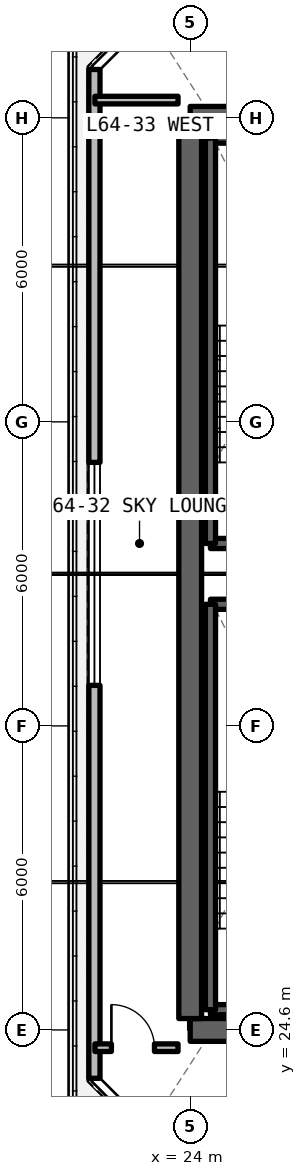
"""IFC4 building model, lengths in metres.
Left out: names, types, materials, properties, quantities, classifications, styles, units other than length and angle.
Written with IfcOpenShell. Run it as: python <this file> out.ifc"""

import sys

from ifc_helpers import new_model, si_unit, direction, frame, frame_2d, origin, place, context, subcontext, project, spatial, rectangle, extrude, element, fill, save


model = new_model("IFC4")
c1 = context("Model", 3, precision=1e-05, world=origin(), true_north=direction((0.0, 1.0)))
c2 = subcontext(c1, "Body", "Model", "MODEL_VIEW")
j1 = project(units=[si_unit("LENGTHUNIT", "METRE"), si_unit("PLANEANGLEUNIT", "RADIAN")], contexts=[c1])
p1 = place(None, origin())
s1 = spatial("IfcSite", under=j1, at=p1, CompositionType="ELEMENT")
p2 = place(p1, origin())
s2 = spatial("IfcBuilding", under=s1, at=p2, CompositionType="ELEMENT")
p3 = place(p2, frame((0.0, 0.0, 229.35)))
s3 = spatial("IfcBuildingStorey", under=s2, at=p3, CompositionType="ELEMENT", Elevation=229.35)
p4 = place(p3, frame((24.0, 24.6, 0.0), z_axis=(0.0, 0.0, 1.0), x_axis=(1.0, 0.0, 0.0)))
e1 = element("IfcWall", 1, at=p4, inside=s3, PredefinedType="SHEAR", context=c2, shape_type="SweptSolid", body=[
    extrude(rectangle(XDim=12.0, YDim=0.45, at=frame_2d((6.0, 0.0))), origin(), (0.0, 0.0, 1.0), 3.3),
])
p5 = place(p4, frame((7.2, 0.0, 0.0)))
e2 = element("IfcOpeningElement", 2, at=p5, cuts=e1, PredefinedType="OPENING", context=c2, shape_type="SweptSolid", body=[
    extrude(rectangle(XDim=1.0, YDim=2.15, at=frame_2d((0.5, 1.075))), frame((0.0, 0.235, 0.0), z_axis=(0.0, -1.0, 0.0), x_axis=(1.0, 0.0, 0.0)), (0.0, 0.0, 1.0), 0.47),
])
p6 = place(p3, frame((36.0, 42.6, 0.0), z_axis=(0.0, 0.0, 1.0), x_axis=(-1.0, 0.0, 0.0)))
e3 = element("IfcWall", 3, at=p6, inside=s3, PredefinedType="SHEAR", context=c2, shape_type="SweptSolid", body=[
    extrude(rectangle(XDim=12.0, YDim=0.45, at=frame_2d((6.0, 0.0))), origin(), (0.0, 0.0, 1.0), 3.3),
])
p7 = place(p6, frame((3.8, 0.0, 0.0)))
e4 = element("IfcOpeningElement", 4, at=p7, cuts=e3, PredefinedType="OPENING", context=c2, shape_type="SweptSolid", body=[
    extrude(rectangle(XDim=1.0, YDim=2.15, at=frame_2d((0.5, 1.075))), frame((0.0, 0.235, 0.0), z_axis=(0.0, -1.0, 0.0), x_axis=(1.0, 0.0, 0.0)), (0.0, 0.0, 1.0), 0.47),
])
p8 = place(p3, frame((24.0, 24.825, 0.0), z_axis=(0.0, 0.0, 1.0), x_axis=(0.0, 1.0, 0.0)))
e5 = element("IfcWall", 5, at=p8, inside=s3, PredefinedType="SHEAR", context=c2, shape_type="SweptSolid", body=[
    extrude(rectangle(XDim=17.55, YDim=0.45, at=frame_2d((8.775, 0.0))), origin(), (0.0, 0.0, 1.0), 3.3),
])
p9 = place(p3, frame((22.11, 43.554, 0.0), z_axis=(0.0, 0.0, 1.0), x_axis=(0.0, -1.0, 0.0)))
e6 = element("IfcWall", 6, at=p9, inside=s3, PredefinedType="SOLIDWALL", context=c2, shape_type="SweptSolid", body=[
    extrude(rectangle(XDim=19.909, YDim=0.22, at=frame_2d((9.955, 0.0))), origin(), (0.0, 0.0, 1.0), 3.08),
])
p10 = place(p9, frame((7.754, 0.0, 0.78)))
e7 = element("IfcOpeningElement", 7, at=p10, cuts=e6, PredefinedType="OPENING", context=c2, shape_type="SweptSolid", body=[
    extrude(rectangle(XDim=4.4, YDim=1.66, at=frame_2d((2.2, 0.83))), frame((0.0, 0.12, 0.0), z_axis=(0.0, -1.0, 0.0), x_axis=(1.0, 0.0, 0.0)), (0.0, 0.0, 1.0), 0.24),
])
p11 = place(p3, frame((22.12, 24.25, 0.0), z_axis=(0.0, 0.0, 1.0), x_axis=(1.0, 0.0, 0.0)))
e8 = element("IfcWall", 8, at=p11, inside=s3, PredefinedType="SOLIDWALL", context=c2, shape_type="SweptSolid", body=[
    extrude(rectangle(XDim=1.64, YDim=0.15, at=frame_2d((0.82, 0.0))), origin(), (0.0, 0.0, 1.0), 2.35),
])
p12 = place(p11, frame((0.325, 0.0, 0.0)))
e9 = element("IfcOpeningElement", 9, at=p12, cuts=e8, PredefinedType="OPENING", context=c2, shape_type="SweptSolid", body=[
    extrude(rectangle(XDim=0.85, YDim=2.1, at=frame_2d((0.425, 1.05))), frame((0.0, 0.085, 0.0), z_axis=(0.0, -1.0, 0.0), x_axis=(1.0, 0.0, 0.0)), (0.0, 0.0, 1.0), 0.17),
])
p13 = place(p3, frame((22.12, 42.95, 0.0), z_axis=(0.0, 0.0, 1.0), x_axis=(1.0, 0.0, 0.0)))
e10 = element("IfcWall", 10, at=p13, inside=s3, PredefinedType="SOLIDWALL", context=c2, shape_type="SweptSolid", body=[
    extrude(rectangle(XDim=1.64, YDim=0.15, at=frame_2d((0.82, 0.0))), origin(), (0.0, 0.0, 1.0), 2.35),
])
for number, where, z_axis, x_axis in (
    (11, (24.4, 25.0, 0.0), (0.0, 0.0, 1.0), (1.0, 0.0, 0.0)),
    (12, (27.8, 33.0, 0.0), (0.0, 0.0, 1.0), (-1.0, 0.0, 0.0)),
):
    element("IfcWall", number, at=place(p3, frame(where, z_axis=z_axis, x_axis=x_axis)), inside=s3, PredefinedType="SOLIDWALL", context=c2, shape_type="SweptSolid", body=[
        extrude(rectangle(XDim=3.4, YDim=0.2, at=frame_2d((1.7, 0.0))), origin(), (0.0, 0.0, 1.0), 3.3),
    ])
p14 = place(p3, frame((24.4, 33.0, 0.0), z_axis=(0.0, 0.0, 1.0), x_axis=(0.0, -1.0, 0.0)))
e13 = element("IfcWall", 13, at=p14, inside=s3, PredefinedType="SOLIDWALL", context=c2, shape_type="SweptSolid", body=[
    extrude(rectangle(XDim=8.0, YDim=0.2, at=frame_2d((4.0, 0.0))), origin(), (0.0, 0.0, 1.0), 3.3),
])
for number, where, z_axis, x_axis in (
    (14, (24.4, 34.2, 0.0), (0.0, 0.0, 1.0), (1.0, 0.0, 0.0)),
    (15, (27.8, 42.2, 0.0), (0.0, 0.0, 1.0), (-1.0, 0.0, 0.0)),
):
    element("IfcWall", number, at=place(p3, frame(where, z_axis=z_axis, x_axis=x_axis)), inside=s3, PredefinedType="SOLIDWALL", context=c2, shape_type="SweptSolid", body=[
        extrude(rectangle(XDim=3.4, YDim=0.2, at=frame_2d((1.7, 0.0))), origin(), (0.0, 0.0, 1.0), 3.3),
    ])
p15 = place(p3, frame((24.4, 42.2, 0.0), z_axis=(0.0, 0.0, 1.0), x_axis=(0.0, -1.0, 0.0)))
e16 = element("IfcWall", 16, at=p15, inside=s3, PredefinedType="SOLIDWALL", context=c2, shape_type="SweptSolid", body=[
    extrude(rectangle(XDim=8.0, YDim=0.2, at=frame_2d((4.0, 0.0))), origin(), (0.0, 0.0, 1.0), 3.3),
])
p16 = place(p10, origin())
e17 = element("IfcWindow", 17, at=p16, inside=s3, PartitioningType="SINGLE_PANEL", PredefinedType="WINDOW", context=c2, shape_type="SweptSolid", body=[
    extrude(rectangle(XDim=4.4, YDim=1.66, at=frame_2d((2.2, 0.83))), frame((0.0, 0.03, 0.0), z_axis=(0.0, -1.0, 0.0), x_axis=(1.0, 0.0, 0.0)), (0.0, 0.0, 1.0), 0.06),
])
fill(e7, e17)
p17 = place(p12, origin())
e18 = element("IfcDoor", 18, at=p17, inside=s3, OperationType="SINGLE_SWING_LEFT", PredefinedType="DOOR", context=c2, shape_type="SweptSolid", body=[
    extrude(rectangle(XDim=0.85, YDim=2.1, at=frame_2d((0.425, 1.05))), frame((0.0, 0.025, 0.0), z_axis=(0.0, -1.0, 0.0), x_axis=(1.0, 0.0, 0.0)), (0.0, 0.0, 1.0), 0.05),
])
fill(e9, e18)
save(model, sys.argv[1])
